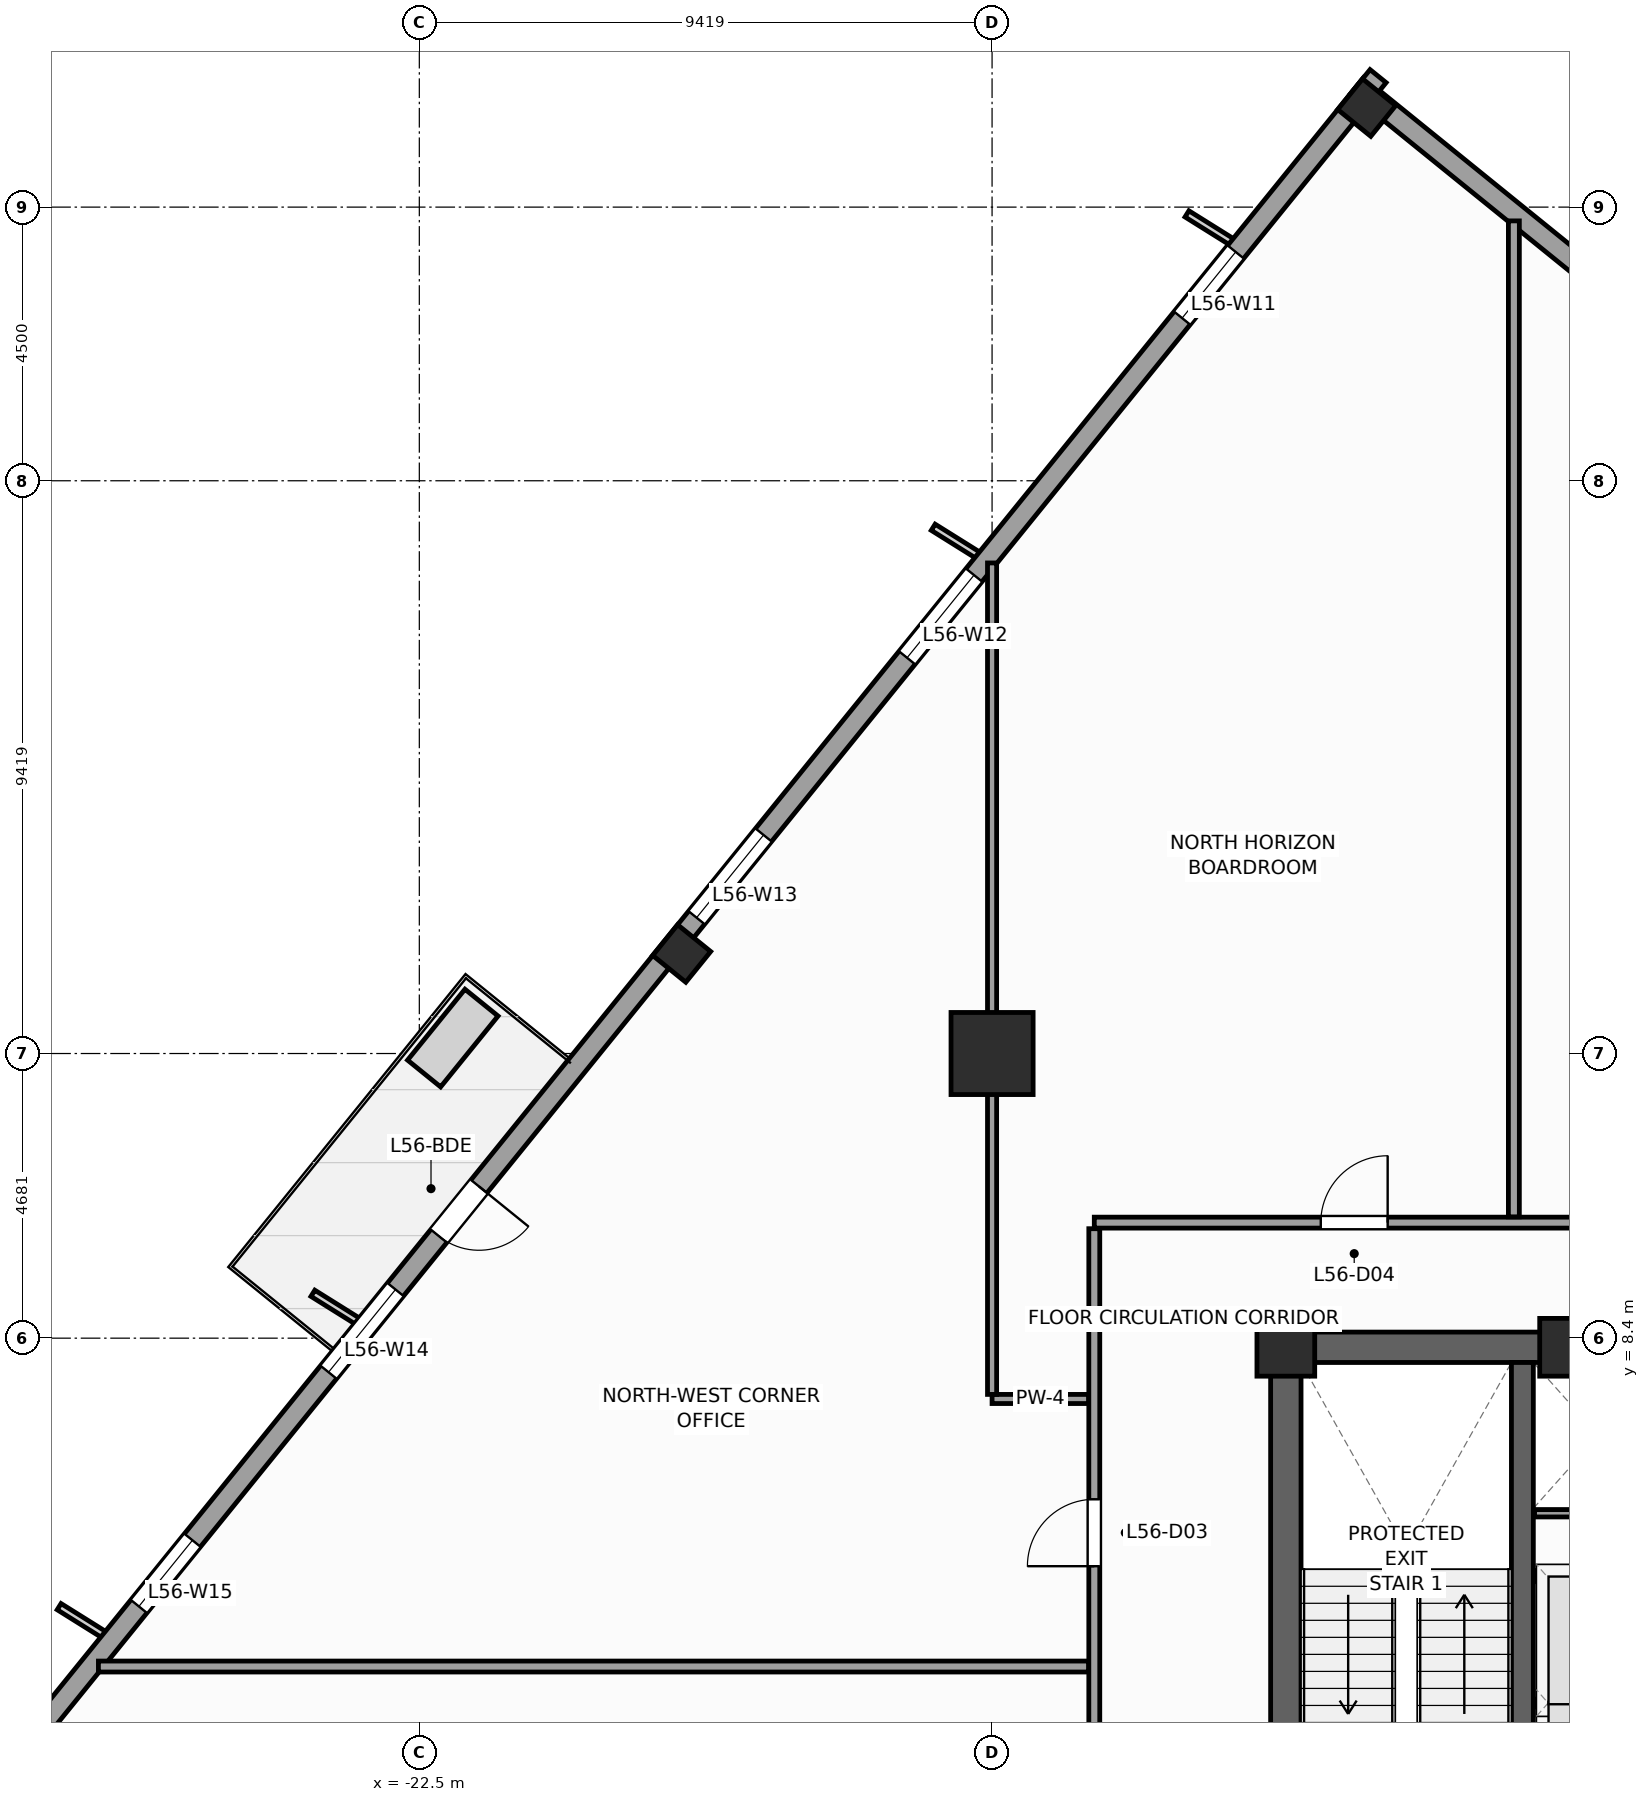
"""IFC4 building model, lengths in metres.
Left out: names, types, materials, properties, quantities, classifications, styles, units other than length and angle.
Written with IfcOpenShell. Run it as: python <this file> out.ifc"""

import sys

from ifc_helpers import new_model, si_unit, direction, frame, frame_2d, origin, origin_2d, place, context, subcontext, project, spatial, rectangle, extrude, source, transform, mapped, element, fill, save


model = new_model("IFC4")
c1 = context("Model", 3, precision=1e-05, world=origin(), true_north=direction((0.0, 1.0)))
c2 = subcontext(c1, "Body", "Model", "MODEL_VIEW")
j1 = project(units=[si_unit("LENGTHUNIT", "METRE"), si_unit("PLANEANGLEUNIT", "RADIAN")], contexts=[c1])
p1 = place(None, origin())
s1 = spatial("IfcSite", under=j1, at=p1, CompositionType="ELEMENT")
p2 = place(p1, origin())
s2 = spatial("IfcBuilding", under=s1, at=p2, CompositionType="ELEMENT")
p3 = place(p2, frame((0.0, 0.0, 232.9)))
s3 = spatial("IfcBuildingStorey", under=s2, at=p3, CompositionType="ELEMENT", Elevation=232.9)
p4 = place(p3, frame((-8.5, 8.25, 0.0), z_axis=(0.0, 0.0, 1.0), x_axis=(1.0, 0.0, 0.0)))
e1 = element("IfcWall", 1, at=p4, inside=s3, PredefinedType="SHEAR", context=c2, shape_type="SweptSolid", body=[
    extrude(rectangle(XDim=17.0, YDim=0.5, at=frame_2d((8.5, 0.0))), origin(), (0.0, 0.0, 1.0), 3.9),
])
p5 = place(p3, frame((-8.25, -8.0, 0.0), z_axis=(0.0, 0.0, 1.0), x_axis=(0.0, 1.0, 0.0)))
e2 = element("IfcWall", 2, at=p5, inside=s3, PredefinedType="SHEAR", context=c2, shape_type="SweptSolid", body=[
    extrude(rectangle(XDim=16.0, YDim=0.5, at=frame_2d((8.0, 0.0))), origin(), (0.0, 0.0, 1.0), 3.9),
])
p6 = place(p5, frame((4.69, 0.0, 0.0)))
e3 = element("IfcOpeningElement", 3, at=p6, cuts=e2, PredefinedType="OPENING", context=c2, shape_type="SweptSolid", body=[
    extrude(rectangle(XDim=1.3, YDim=2.2, at=frame_2d((0.65, 1.1))), frame((0.0, 0.26, 0.0), z_axis=(0.0, -1.0, 0.0), x_axis=(1.0, 0.0, 0.0)), (0.0, 0.0, 1.0), 0.52),
])
p7 = place(p3, frame((-4.36, -8.0, 0.0), z_axis=(0.0, 0.0, 1.0), x_axis=(0.0, 1.0, 0.0)))
e4 = element("IfcWall", 4, at=p7, inside=s3, PredefinedType="SHEAR", context=c2, shape_type="SweptSolid", body=[
    extrude(rectangle(XDim=16.0, YDim=0.36, at=frame_2d((8.0, 0.0))), origin(), (0.0, 0.0, 1.0), 3.9),
])
m1 = source(origin(), c2, "Body", "SweptSolid", [
    extrude(rectangle(XDim=0.95, YDim=0.95, at=origin_2d()), origin(), (0.0, 0.0, 1.0), 3.9),
])
for number, where, z_axis, x_axis in (
    (5, (-8.25, 8.25, 0.0), (0.0, 0.0, 1.0), (1.0, 0.0, 0.0)),
    (6, (-3.6, 8.25, 0.0), (0.0, 0.0, 1.0), (1.0, 0.0, 0.0)),
):
    element("IfcColumn", number, at=place(p3, frame(where, z_axis=z_axis, x_axis=x_axis)), inside=s3, PredefinedType="PILASTER", context=c2, shape_type="MappedRepresentation", body=[
        mapped(m1, transform((0.0, 0.0, 0.0), scale=1.0)),
    ])
m2 = source(origin(), c2, "Body", "SweptSolid", [
    extrude(rectangle(XDim=1.35, YDim=1.35, at=origin_2d()), origin(), (0.0, 0.0, 1.0), 3.9),
])
p8 = place(p3, frame((-13.081, 13.081, 0.0), z_axis=(0.0, 0.0, 1.0), x_axis=(1.0, 0.0, 0.0)))
e7 = element("IfcColumn", 7, at=p8, inside=s3, PredefinedType="COLUMN", context=c2, shape_type="MappedRepresentation", body=[
    mapped(m2, transform((0.0, 0.0, 0.0), scale=1.0)),
])
m3 = source(origin(), c2, "Body", "SweptSolid", [
    extrude(rectangle(XDim=0.65, YDim=0.7, at=origin_2d()), origin(), (0.0, 0.0, 1.0), 3.9),
])
for number, where, z_axis, x_axis in (
    (8, (-6.92, 28.637, 0.0), (0.0, 0.0, 1.0), (0.629, 0.777, 0.0)),
    (9, (-18.185, 14.726, 0.0), (0.0, 0.0, 1.0), (0.629, 0.777, 0.0)),
):
    element("IfcColumn", number, at=place(p3, frame(where, z_axis=z_axis, x_axis=x_axis)), inside=s3, PredefinedType="COLUMN", context=c2, shape_type="MappedRepresentation", body=[
        mapped(m3, transform((0.0, 0.0, 0.0), scale=1.0)),
    ])
p9 = place(p3, frame((-2.673, 25.429, 0.0), z_axis=(0.0, 0.0, 1.0), x_axis=(-0.777162640055, 0.629299794138, 0.0)))
e10 = element("IfcWall", 10, at=p9, inside=s3, PredefinedType="STANDARD", context=c2, shape_type="SweptSolid", body=[
    extrude(rectangle(XDim=5.67, YDim=0.34, at=frame_2d((2.835, 0.0))), origin(), (0.0, 0.0, 1.0), 3.66),
])
p10 = place(p3, frame((-6.733, 29.154, 0.0), z_axis=(0.0, 0.0, 1.0), x_axis=(-0.629325378072, -0.77714192302, 0.0)))
e11 = element("IfcWall", 11, at=p10, inside=s3, PredefinedType="STANDARD", context=c2, shape_type="SweptSolid", body=[
    extrude(rectangle(XDim=36.84, YDim=0.34, at=frame_2d((18.42, 0.0))), origin(), (0.0, 0.0, 1.0), 2.96),
])
p11 = place(p10, frame((23.495, 0.0, 0.0)))
e12 = element("IfcOpeningElement", 12, at=p11, cuts=e11, PredefinedType="OPENING", context=c2, shape_type="SweptSolid", body=[
    extrude(rectangle(XDim=1.05, YDim=2.25, at=frame_2d((0.525, 1.125))), frame((0.0, 0.18, 0.0), z_axis=(0.0, -1.0, 0.0), x_axis=(1.0, 0.0, 0.0)), (0.0, 0.0, 1.0), 0.36),
])
p12 = place(p10, frame((3.721, 0.0, 0.48)))
e13 = element("IfcOpeningElement", 13, at=p12, cuts=e11, PredefinedType="OPENING", context=c2, shape_type="SweptSolid", body=[
    extrude(rectangle(XDim=1.4, YDim=2.4, at=frame_2d((0.7, 1.2))), frame((0.0, 0.18, 0.0), z_axis=(0.0, -1.0, 0.0), x_axis=(1.0, 0.0, 0.0)), (0.0, 0.0, 1.0), 0.36),
])
p13 = place(p10, frame((10.559, 0.0, 0.58)))
e14 = element("IfcOpeningElement", 14, at=p13, cuts=e11, PredefinedType="OPENING", context=c2, shape_type="SweptSolid", body=[
    extrude(rectangle(XDim=1.75, YDim=2.3, at=frame_2d((0.875, 1.15))), frame((0.0, 0.18, 0.0), z_axis=(0.0, -1.0, 0.0), x_axis=(1.0, 0.0, 0.0)), (0.0, 0.0, 1.0), 0.36),
])
p14 = place(p10, frame((16.058, 0.0, 0.58)))
e15 = element("IfcOpeningElement", 15, at=p14, cuts=e11, PredefinedType="OPENING", context=c2, shape_type="SweptSolid", body=[
    extrude(rectangle(XDim=1.75, YDim=2.3, at=frame_2d((0.875, 1.15))), frame((0.0, 0.18, 0.0), z_axis=(0.0, -1.0, 0.0), x_axis=(1.0, 0.0, 0.0)), (0.0, 0.0, 1.0), 0.36),
])
p15 = place(p10, frame((25.676, 0.0, 0.58)))
e16 = element("IfcOpeningElement", 16, at=p15, cuts=e11, PredefinedType="OPENING", context=c2, shape_type="SweptSolid", body=[
    extrude(rectangle(XDim=1.75, YDim=2.3, at=frame_2d((0.875, 1.15))), frame((0.0, 0.18, 0.0), z_axis=(0.0, -1.0, 0.0), x_axis=(1.0, 0.0, 0.0)), (0.0, 0.0, 1.0), 0.36),
])
p16 = place(p10, frame((30.982, 0.0, 0.48)))
e17 = element("IfcOpeningElement", 17, at=p16, cuts=e11, PredefinedType="OPENING", context=c2, shape_type="SweptSolid", body=[
    extrude(rectangle(XDim=1.4, YDim=2.4, at=frame_2d((0.7, 1.2))), frame((0.0, 0.18, 0.0), z_axis=(0.0, -1.0, 0.0), x_axis=(1.0, 0.0, 0.0)), (0.0, 0.0, 1.0), 0.36),
])
p17 = place(p3, frame((-4.17, 4.49, 0.0), z_axis=(0.0, 0.0, 1.0), x_axis=(1.0, 0.0, 0.0)))
e18 = element("IfcWall", 18, at=p17, inside=s3, PredefinedType="PARTITIONING", context=c2, shape_type="SweptSolid", body=[
    extrude(rectangle(XDim=2.28, YDim=0.18, at=frame_2d((1.14, 0.0))), origin(), (0.0, 0.0, 1.0), 3.66),
])
p18 = place(p3, frame((-4.16, 2.4, 0.0), z_axis=(0.0, 0.0, 1.0), x_axis=(1.0, 0.0, 0.0)))
e19 = element("IfcWall", 19, at=p18, inside=s3, PredefinedType="PARTITIONING", context=c2, shape_type="SweptSolid", body=[
    extrude(rectangle(XDim=2.26, YDim=0.12, at=frame_2d((1.13, 0.0))), origin(), (0.0, 0.0, 1.0), 3.66),
])
p19 = place(p3, frame((-4.16, 5.52, 0.0), z_axis=(0.0, 0.0, 1.0), x_axis=(1.0, 0.0, 0.0)))
e20 = element("IfcWall", 20, at=p19, inside=s3, PredefinedType="PARTITIONING", context=c2, shape_type="SweptSolid", body=[
    extrude(rectangle(XDim=2.1, YDim=0.12, at=frame_2d((1.05, 0.0))), origin(), (0.0, 0.0, 1.0), 3.66),
])
p20 = place(p3, frame((-11.4, 10.3, 0.0), z_axis=(0.0, 0.0, 1.0), x_axis=(1.0, 0.0, 0.0)))
e21 = element("IfcWall", 21, at=p20, inside=s3, PredefinedType="PARTITIONING", context=c2, shape_type="SweptSolid", body=[
    extrude(rectangle(XDim=21.7, YDim=0.18, at=frame_2d((10.85, 0.0))), origin(), (0.0, 0.0, 1.0), 3.66),
])
p21 = place(p20, frame((10.925, 0.0, 0.0)))
e22 = element("IfcOpeningElement", 22, at=p21, cuts=e21, PredefinedType="OPENING", context=c2, shape_type="SweptSolid", body=[
    extrude(rectangle(XDim=0.95, YDim=2.1, at=frame_2d((0.475, 1.05))), frame((0.0, 0.1, 0.0), z_axis=(0.0, -1.0, 0.0), x_axis=(1.0, 0.0, 0.0)), (0.0, 0.0, 1.0), 0.2),
])
p22 = place(p20, frame((3.724, 0.0, 0.0)))
e23 = element("IfcOpeningElement", 23, at=p22, cuts=e21, PredefinedType="OPENING", context=c2, shape_type="SweptSolid", body=[
    extrude(rectangle(XDim=1.1, YDim=2.2, at=frame_2d((0.55, 1.1))), frame((0.0, 0.1, 0.0), z_axis=(0.0, -1.0, 0.0), x_axis=(1.0, 0.0, 0.0)), (0.0, 0.0, 1.0), 0.2),
])
p23 = place(p20, frame((8.326, 0.0, 0.0)))
e24 = element("IfcOpeningElement", 24, at=p23, cuts=e21, PredefinedType="OPENING", context=c2, shape_type="SweptSolid", body=[
    extrude(rectangle(XDim=1.1, YDim=2.2, at=frame_2d((0.55, 1.1))), frame((0.0, 0.1, 0.0), z_axis=(0.0, -1.0, 0.0), x_axis=(1.0, 0.0, 0.0)), (0.0, 0.0, 1.0), 0.2),
])
p24 = place(p20, frame((18.085, 0.0, 0.0)))
e25 = element("IfcOpeningElement", 25, at=p24, cuts=e21, PredefinedType="OPENING", context=c2, shape_type="SweptSolid", body=[
    extrude(rectangle(XDim=1.1, YDim=2.2, at=frame_2d((0.55, 1.1))), frame((0.0, 0.1, 0.0), z_axis=(0.0, -1.0, 0.0), x_axis=(1.0, 0.0, 0.0)), (0.0, 0.0, 1.0), 0.2),
])
p25 = place(p3, frame((-11.4, -10.2, 0.0), z_axis=(0.0, 0.0, 1.0), x_axis=(0.0, 1.0, 0.0)))
e26 = element("IfcWall", 26, at=p25, inside=s3, PredefinedType="PARTITIONING", context=c2, shape_type="SweptSolid", body=[
    extrude(rectangle(XDim=20.4, YDim=0.18, at=frame_2d((10.2, 0.0))), origin(), (0.0, 0.0, 1.0), 3.66),
])
p26 = place(p25, frame((14.85, 0.0, 0.0)))
e27 = element("IfcOpeningElement", 27, at=p26, cuts=e26, PredefinedType="OPENING", context=c2, shape_type="SweptSolid", body=[
    extrude(rectangle(XDim=1.1, YDim=2.2, at=frame_2d((0.55, 1.1))), frame((0.0, 0.1, 0.0), z_axis=(0.0, -1.0, 0.0), x_axis=(1.0, 0.0, 0.0)), (0.0, 0.0, 1.0), 0.2),
])
p27 = place(p25, frame((4.7, 0.0, 0.0)))
e28 = element("IfcOpeningElement", 28, at=p27, cuts=e26, PredefinedType="OPENING", context=c2, shape_type="SweptSolid", body=[
    extrude(rectangle(XDim=1.1, YDim=2.2, at=frame_2d((0.55, 1.1))), frame((0.0, 0.1, 0.0), z_axis=(0.0, -1.0, 0.0), x_axis=(1.0, 0.0, 0.0)), (0.0, 0.0, 1.0), 0.2),
])
p28 = place(p25, frame((9.9, 0.0, 0.0)))
e29 = element("IfcOpeningElement", 29, at=p28, cuts=e26, PredefinedType="OPENING", context=c2, shape_type="SweptSolid", body=[
    extrude(rectangle(XDim=1.1, YDim=2.2, at=frame_2d((0.55, 1.1))), frame((0.0, 0.1, 0.0), z_axis=(0.0, -1.0, 0.0), x_axis=(1.0, 0.0, 0.0)), (0.0, 0.0, 1.0), 0.2),
])
p29 = place(p3, frame((-4.5, 10.395, 0.0), z_axis=(0.0, 0.0, 1.0), x_axis=(0.0, 1.0, 0.0)))
e30 = element("IfcWall", 30, at=p29, inside=s3, PredefinedType="PARTITIONING", context=c2, shape_type="SweptSolid", body=[
    extrude(rectangle(XDim=16.378, YDim=0.18, at=frame_2d((8.189, 0.0))), origin(), (0.0, 0.0, 1.0), 3.66),
])
p30 = place(p3, frame((-11.495, 3.0, 0.0), z_axis=(0.0, 0.0, 1.0), x_axis=(-1.0, 0.0, 0.0)))
e31 = element("IfcWall", 31, at=p30, inside=s3, PredefinedType="PARTITIONING", context=c2, shape_type="SweptSolid", body=[
    extrude(rectangle(XDim=16.282, YDim=0.18, at=frame_2d((8.141, 0.0))), origin(), (0.0, 0.0, 1.0), 3.66),
])
p31 = place(p3, frame((-11.495, 7.4, 0.0), z_axis=(0.0, 0.0, 1.0), x_axis=(-1.0, 0.0, 0.0)))
e32 = element("IfcWall", 32, at=p31, inside=s3, PredefinedType="PARTITIONING", context=c2, shape_type="SweptSolid", body=[
    extrude(rectangle(XDim=1.586, YDim=0.15, at=frame_2d((0.793, 0.0))), origin(), (0.0, 0.0, 1.0), 3.66),
])
p32 = place(p3, frame((-13.081, 7.475, 0.0), z_axis=(0.0, 0.0, 1.0), x_axis=(0.0, 1.0, 0.0)))
e33 = element("IfcWall", 33, at=p32, inside=s3, PredefinedType="PARTITIONING", context=c2, shape_type="SweptSolid", body=[
    extrude(rectangle(XDim=13.673, YDim=0.15, at=frame_2d((6.837, 0.0))), origin(), (0.0, 0.0, 1.0), 2.76),
])
m4 = source(origin(), c2, "Body", "SweptSolid", [
    extrude(rectangle(XDim=1.05, YDim=2.25, at=frame_2d((0.525, 1.125))), frame((0.0, 0.025, 0.0), z_axis=(0.0, -1.0, 0.0), x_axis=(1.0, 0.0, 0.0)), (0.0, 0.0, 1.0), 0.05),
])
p33 = place(p11, origin())
e34 = element("IfcDoor", 34, at=p33, inside=s3, OperationType="SINGLE_SWING_LEFT", PredefinedType="DOOR", context=c2, shape_type="MappedRepresentation", body=[
    mapped(m4, transform((0.0, 0.0, 0.0), scale=1.0)),
])
fill(e12, e34)
m5 = source(origin(), c2, "Body", "SweptSolid", [
    extrude(rectangle(XDim=1.4, YDim=2.4, at=frame_2d((0.7, 1.2))), frame((0.0, 0.03, 0.0), z_axis=(0.0, -1.0, 0.0), x_axis=(1.0, 0.0, 0.0)), (0.0, 0.0, 1.0), 0.06),
])
p34 = place(p12, origin())
e35 = element("IfcWindow", 35, at=p34, inside=s3, PartitioningType="SINGLE_PANEL", PredefinedType="WINDOW", context=c2, shape_type="MappedRepresentation", body=[
    mapped(m5, transform((0.0, 0.0, 0.0), scale=1.0)),
])
fill(e13, e35)
m6 = source(origin(), c2, "Body", "SweptSolid", [
    extrude(rectangle(XDim=1.75, YDim=2.3, at=frame_2d((0.875, 1.15))), frame((0.0, 0.03, 0.0), z_axis=(0.0, -1.0, 0.0), x_axis=(1.0, 0.0, 0.0)), (0.0, 0.0, 1.0), 0.06),
])
p35 = place(p13, origin())
e36 = element("IfcWindow", 36, at=p35, inside=s3, PartitioningType="SINGLE_PANEL", PredefinedType="WINDOW", context=c2, shape_type="MappedRepresentation", body=[
    mapped(m6, transform((0.0, 0.0, 0.0), scale=1.0)),
])
fill(e14, e36)
p36 = place(p14, origin())
e37 = element("IfcWindow", 37, at=p36, inside=s3, PartitioningType="SINGLE_PANEL", PredefinedType="WINDOW", context=c2, shape_type="MappedRepresentation", body=[
    mapped(m6, transform((0.0, 0.0, 0.0), scale=1.0)),
])
fill(e15, e37)
p37 = place(p15, origin())
e38 = element("IfcWindow", 38, at=p37, inside=s3, PartitioningType="SINGLE_PANEL", PredefinedType="WINDOW", context=c2, shape_type="MappedRepresentation", body=[
    mapped(m6, transform((0.0, 0.0, 0.0), scale=1.0)),
])
fill(e16, e38)
p38 = place(p16, origin())
e39 = element("IfcWindow", 39, at=p38, inside=s3, PartitioningType="SINGLE_PANEL", PredefinedType="WINDOW", context=c2, shape_type="MappedRepresentation", body=[
    mapped(m5, transform((0.0, 0.0, 0.0), scale=1.0)),
])
fill(e17, e39)
m7 = source(origin(), c2, "Body", "SweptSolid", [
    extrude(rectangle(XDim=1.1, YDim=2.2, at=frame_2d((0.55, 1.1))), frame((0.0, 0.025, 0.0), z_axis=(0.0, -1.0, 0.0), x_axis=(1.0, 0.0, 0.0)), (0.0, 0.0, 1.0), 0.05),
])
p39 = place(p26, origin())
e40 = element("IfcDoor", 40, at=p39, inside=s3, OperationType="SINGLE_SWING_LEFT", PredefinedType="DOOR", context=c2, shape_type="MappedRepresentation", body=[
    mapped(m7, transform((0.0, 0.0, 0.0), scale=1.0)),
])
fill(e27, e40)
p40 = place(p22, origin())
e41 = element("IfcDoor", 41, at=p40, inside=s3, OperationType="SINGLE_SWING_RIGHT", PredefinedType="DOOR", context=c2, shape_type="MappedRepresentation", body=[
    mapped(m7, transform((0.0, 0.0, 0.0), scale=1.0)),
])
fill(e23, e41)
save(model, sys.argv[1])
